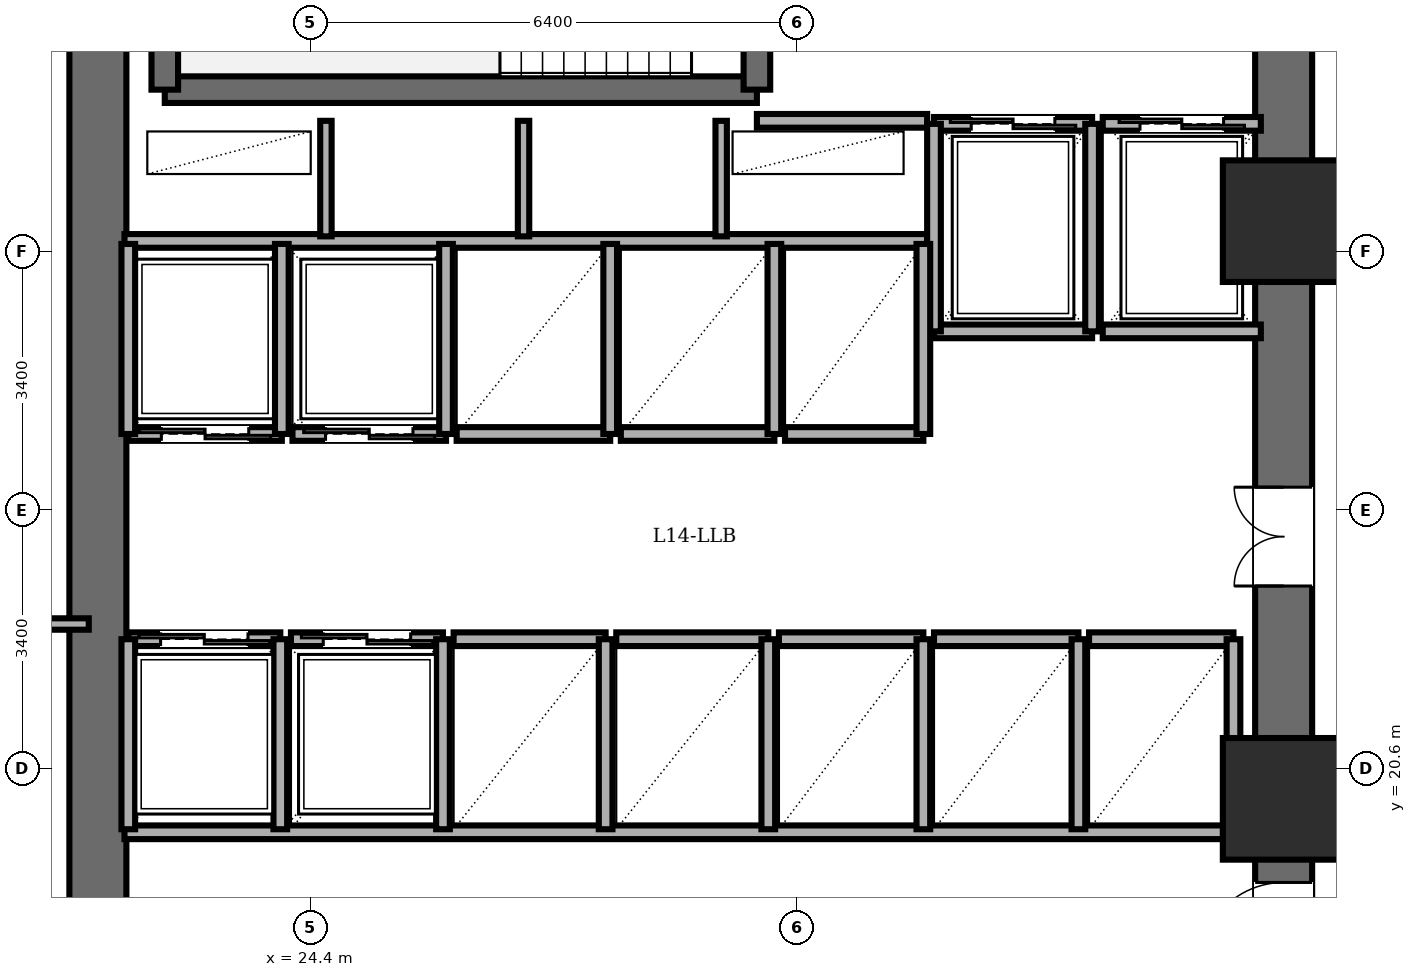
"""IFC4 building model, lengths in metres.
Left out: names, types, materials, properties, quantities, classifications, styles, units other than length and angle.
Written with IfcOpenShell. Run it as: python <this file> out.ifc"""

import sys

from ifc_helpers import new_model, si_unit, direction, frame, frame_2d, origin, origin_2d, place, context, subcontext, project, spatial, rectangle, extrude, element, fill, save


model = new_model("IFC4")
c1 = context("Model", 3, precision=1e-05, world=origin(), true_north=direction((0.0, 1.0)))
c2 = subcontext(c1, "Body", "Model", "MODEL_VIEW")
j1 = project(units=[si_unit("LENGTHUNIT", "METRE"), si_unit("PLANEANGLEUNIT", "RADIAN")], contexts=[c1])
p1 = place(None, origin())
s1 = spatial("IfcSite", under=j1, at=p1, CompositionType="ELEMENT")
p2 = place(p1, origin())
s2 = spatial("IfcBuilding", under=s1, at=p2, CompositionType="ELEMENT")
p3 = place(p2, frame((0.0, 0.0, 54.0)))
s3 = spatial("IfcBuildingStorey", under=s2, at=p3, CompositionType="ELEMENT", Elevation=54.0)
for number, where, z_axis, x_axis in (
    (1, (37.2, 20.2, 0.0), (0.0, 0.0, 1.0), (1.0, 0.0, 0.0)),
    (2, (37.2, 27.8, 0.0), (0.0, 0.0, 1.0), (1.0, 0.0, 0.0)),
):
    element("IfcColumn", number, at=place(p3, frame(where, z_axis=z_axis, x_axis=x_axis)), inside=s3, PredefinedType="COLUMN", context=c2, shape_type="SweptSolid", body=[
        extrude(rectangle(XDim=1.6, YDim=1.6, at=origin_2d()), origin(), (0.0, 0.0, 1.0), 3.6),
    ])
p4 = place(p3, frame((21.6, 14.4, 0.0), z_axis=(0.0, 0.0, 1.0), x_axis=(0.0, 1.0, 0.0)))
e3 = element("IfcWall", 3, at=p4, inside=s3, PredefinedType="SHEAR", context=c2, shape_type="SweptSolid", body=[
    extrude(rectangle(XDim=19.2, YDim=0.75, at=frame_2d((9.6, 0.0))), origin(), (0.0, 0.0, 1.0), 3.4),
])
p5 = place(p3, frame((37.2, 14.4, 0.0), z_axis=(0.0, 0.0, 1.0), x_axis=(0.0, 1.0, 0.0)))
e4 = element("IfcWall", 4, at=p5, inside=s3, PredefinedType="SHEAR", context=c2, shape_type="SweptSolid", body=[
    extrude(rectangle(XDim=19.2, YDim=0.75, at=frame_2d((9.6, 0.0))), origin(), (0.0, 0.0, 1.0), 3.4),
])
p6 = place(p5, frame((15.8, 0.0, 0.0)))
e5 = element("IfcOpeningElement", 5, at=p6, cuts=e4, PredefinedType="OPENING", context=c2, shape_type="SweptSolid", body=[
    extrude(rectangle(XDim=1.15, YDim=2.15, at=frame_2d((0.575, 1.075))), frame((0.0, 0.385, 0.0), z_axis=(0.0, -1.0, 0.0), x_axis=(1.0, 0.0, 0.0)), (0.0, 0.0, 1.0), 0.77),
])
p7 = place(p5, frame((3.6, 0.0, 0.0)))
e6 = element("IfcOpeningElement", 6, at=p7, cuts=e4, PredefinedType="OPENING", context=c2, shape_type="SweptSolid", body=[
    extrude(rectangle(XDim=1.1, YDim=2.15, at=frame_2d((0.55, 1.075))), frame((0.0, 0.385, 0.0), z_axis=(0.0, -1.0, 0.0), x_axis=(1.0, 0.0, 0.0)), (0.0, 0.0, 1.0), 0.77),
])
p8 = place(p5, frame((8.6, 0.0, 0.0)))
e7 = element("IfcOpeningElement", 7, at=p8, cuts=e4, PredefinedType="OPENING", context=c2, shape_type="SweptSolid", body=[
    extrude(rectangle(XDim=1.3, YDim=2.2, at=frame_2d((0.65, 1.1))), frame((0.0, 0.385, 0.0), z_axis=(0.0, -1.0, 0.0), x_axis=(1.0, 0.0, 0.0)), (0.0, 0.0, 1.0), 0.77),
])
p9 = place(p3, frame((22.48, 29.53, 0.0), z_axis=(0.0, 0.0, 1.0), x_axis=(1.0, 0.0, 0.0)))
e8 = element("IfcWall", 8, at=p9, inside=s3, PredefinedType="SOLIDWALL", context=c2, shape_type="SweptSolid", body=[
    extrude(rectangle(XDim=7.79, YDim=0.35, at=frame_2d((3.895, 0.0))), origin(), (0.0, 0.0, 1.0), 3.4),
])
p10 = place(p3, frame((22.48, 29.53, 0.0), z_axis=(0.0, 0.0, 1.0), x_axis=(0.0, 1.0, 0.0)))
e9 = element("IfcWall", 9, at=p10, inside=s3, PredefinedType="SOLIDWALL", context=c2, shape_type="SweptSolid", body=[
    extrude(rectangle(XDim=3.58, YDim=0.35, at=frame_2d((1.79, 0.0))), origin(), (0.0, 0.0, 1.0), 3.4),
])
p11 = place(p3, frame((30.27, 29.53, 0.0), z_axis=(0.0, 0.0, 1.0), x_axis=(0.0, 1.0, 0.0)))
e10 = element("IfcWall", 10, at=p11, inside=s3, PredefinedType="SOLIDWALL", context=c2, shape_type="SweptSolid", body=[
    extrude(rectangle(XDim=3.58, YDim=0.35, at=frame_2d((1.79, 0.0))), origin(), (0.0, 0.0, 1.0), 3.4),
])
p12 = place(p11, frame((1.25, 0.0, 0.0)))
e11 = element("IfcOpeningElement", 11, at=p12, cuts=e10, PredefinedType="OPENING", context=c2, shape_type="SweptSolid", body=[
    extrude(rectangle(XDim=1.1, YDim=2.15, at=frame_2d((0.55, 1.075))), frame((0.0, 0.185, 0.0), z_axis=(0.0, -1.0, 0.0), x_axis=(1.0, 0.0, 0.0)), (0.0, 0.0, 1.0), 0.37),
])
p13 = place(p3, frame((30.27, 29.12, 0.0), z_axis=(0.0, 0.0, 1.0), x_axis=(1.0, 0.0, 0.0)))
e12 = element("IfcWall", 12, at=p13, inside=s3, PredefinedType="PARTITIONING", context=c2, shape_type="SweptSolid", body=[
    extrude(rectangle(XDim=2.24, YDim=0.18, at=frame_2d((1.12, 0.0))), origin(), (0.0, 0.0, 1.0), 3.4),
])
p14 = place(p3, frame((21.95, 27.54, 0.0), z_axis=(0.0, 0.0, 1.0), x_axis=(1.0, 0.0, 0.0)))
e13 = element("IfcWall", 13, at=p14, inside=s3, PredefinedType="PARTITIONING", context=c2, shape_type="SweptSolid", body=[
    extrude(rectangle(XDim=10.56, YDim=0.18, at=frame_2d((5.28, 0.0))), origin(), (0.0, 0.0, 1.0), 3.4),
])
for number, where, z_axis, x_axis in (
    (14, (24.6, 27.6, 0.0), (0.0, 0.0, 1.0), (0.0, 1.0, 0.0)),
    (15, (27.2, 27.6, 0.0), (0.0, 0.0, 1.0), (0.0, 1.0, 0.0)),
    (16, (29.8, 27.6, 0.0), (0.0, 0.0, 1.0), (0.0, 1.0, 0.0)),
):
    element("IfcWall", number, at=place(p3, frame(where, z_axis=z_axis, x_axis=x_axis)), inside=s3, PredefinedType="PARTITIONING", context=c2, shape_type="SweptSolid", body=[
        extrude(rectangle(XDim=1.52, YDim=0.15, at=frame_2d((0.76, 0.0))), origin(), (0.0, 0.0, 1.0), 3.4),
    ])
p15 = place(p3, frame((21.95, 19.76, 0.0), z_axis=(0.0, 0.0, 1.0), x_axis=(1.0, 0.0, 0.0)))
e17 = element("IfcWall", 17, at=p15, inside=s3, PredefinedType="PARTITIONING", context=c2, shape_type="SweptSolid", body=[
    extrude(rectangle(XDim=14.87, YDim=0.18, at=frame_2d((7.435, 0.0))), origin(), (0.0, 0.0, 1.0), 3.4),
])
p16 = place(p3, frame((32.6, 29.08, 0.0), z_axis=(0.0, 0.0, 1.0), x_axis=(1.0, 0.0, 0.0)))
e18 = element("IfcWall", 18, at=p16, inside=s3, PredefinedType="PARTITIONING", context=c2, shape_type="SweptSolid", body=[
    extrude(rectangle(XDim=2.08, YDim=0.18, at=frame_2d((1.04, 0.0))), origin(), (0.0, 0.0, 1.0), 3.4),
])
p17 = place(p16, frame((0.49, 0.0, 0.0)))
e19 = element("IfcOpeningElement", 19, at=p17, cuts=e18, PredefinedType="OPENING", context=c2, shape_type="SweptSolid", body=[
    extrude(rectangle(XDim=1.1, YDim=2.2, at=frame_2d((0.55, 1.1))), frame((0.0, 0.1, 0.0), z_axis=(0.0, -1.0, 0.0), x_axis=(1.0, 0.0, 0.0)), (0.0, 0.0, 1.0), 0.2),
])
p18 = place(p3, frame((34.68, 26.35, 0.0), z_axis=(0.0, 0.0, 1.0), x_axis=(-1.0, 0.0, 0.0)))
e20 = element("IfcWall", 20, at=p18, inside=s3, PredefinedType="PARTITIONING", context=c2, shape_type="SweptSolid", body=[
    extrude(rectangle(XDim=2.08, YDim=0.18, at=frame_2d((1.04, 0.0))), origin(), (0.0, 0.0, 1.0), 3.4),
])
for number, where, z_axis, x_axis in (
    (21, (34.68, 26.35, 0.0), (0.0, 0.0, 1.0), (0.0, 1.0, 0.0)),
    (22, (32.6, 29.08, 0.0), (0.0, 0.0, 1.0), (0.0, -1.0, 0.0)),
):
    element("IfcWall", number, at=place(p3, frame(where, z_axis=z_axis, x_axis=x_axis)), inside=s3, PredefinedType="PARTITIONING", context=c2, shape_type="SweptSolid", body=[
        extrude(rectangle(XDim=2.73, YDim=0.18, at=frame_2d((1.365, 0.0))), origin(), (0.0, 0.0, 1.0), 3.4),
    ])
p19 = place(p3, frame((34.82, 29.08, 0.0), z_axis=(0.0, 0.0, 1.0), x_axis=(1.0, 0.0, 0.0)))
e23 = element("IfcWall", 23, at=p19, inside=s3, PredefinedType="PARTITIONING", context=c2, shape_type="SweptSolid", body=[
    extrude(rectangle(XDim=2.08, YDim=0.18, at=frame_2d((1.04, 0.0))), origin(), (0.0, 0.0, 1.0), 3.4),
])
p20 = place(p19, frame((0.49, 0.0, 0.0)))
e24 = element("IfcOpeningElement", 24, at=p20, cuts=e23, PredefinedType="OPENING", context=c2, shape_type="SweptSolid", body=[
    extrude(rectangle(XDim=1.1, YDim=2.2, at=frame_2d((0.55, 1.1))), frame((0.0, 0.1, 0.0), z_axis=(0.0, -1.0, 0.0), x_axis=(1.0, 0.0, 0.0)), (0.0, 0.0, 1.0), 0.2),
])
p21 = place(p3, frame((36.9, 26.35, 0.0), z_axis=(0.0, 0.0, 1.0), x_axis=(-1.0, 0.0, 0.0)))
e25 = element("IfcWall", 25, at=p21, inside=s3, PredefinedType="PARTITIONING", context=c2, shape_type="SweptSolid", body=[
    extrude(rectangle(XDim=2.08, YDim=0.18, at=frame_2d((1.04, 0.0))), origin(), (0.0, 0.0, 1.0), 3.4),
])
p22 = place(p3, frame((24.02, 25.0, 0.0), z_axis=(0.0, 0.0, 1.0), x_axis=(-1.0, 0.0, 0.0)))
e26 = element("IfcWall", 26, at=p22, inside=s3, PredefinedType="PARTITIONING", context=c2, shape_type="SweptSolid", body=[
    extrude(rectangle(XDim=2.02, YDim=0.18, at=frame_2d((1.01, 0.0))), origin(), (0.0, 0.0, 1.0), 3.4),
])
p23 = place(p22, frame((0.435, 0.0, 0.0)))
e27 = element("IfcOpeningElement", 27, at=p23, cuts=e26, PredefinedType="OPENING", context=c2, shape_type="SweptSolid", body=[
    extrude(rectangle(XDim=1.15, YDim=2.2, at=frame_2d((0.575, 1.1))), frame((0.0, 0.1, 0.0), z_axis=(0.0, -1.0, 0.0), x_axis=(1.0, 0.0, 0.0)), (0.0, 0.0, 1.0), 0.2),
])
for number, where, z_axis, x_axis in (
    (28, (24.02, 25.0, 0.0), (0.0, 0.0, 1.0), (0.0, 1.0, 0.0)),
    (29, (22.0, 27.5, 0.0), (0.0, 0.0, 1.0), (0.0, -1.0, 0.0)),
):
    element("IfcWall", number, at=place(p3, frame(where, z_axis=z_axis, x_axis=x_axis)), inside=s3, PredefinedType="PARTITIONING", context=c2, shape_type="SweptSolid", body=[
        extrude(rectangle(XDim=2.5, YDim=0.18, at=frame_2d((1.25, 0.0))), origin(), (0.0, 0.0, 1.0), 3.4),
    ])
p24 = place(p3, frame((26.18, 25.0, 0.0), z_axis=(0.0, 0.0, 1.0), x_axis=(-1.0, 0.0, 0.0)))
e30 = element("IfcWall", 30, at=p24, inside=s3, PredefinedType="PARTITIONING", context=c2, shape_type="SweptSolid", body=[
    extrude(rectangle(XDim=2.02, YDim=0.18, at=frame_2d((1.01, 0.0))), origin(), (0.0, 0.0, 1.0), 3.4),
])
p25 = place(p24, frame((0.435, 0.0, 0.0)))
e31 = element("IfcOpeningElement", 31, at=p25, cuts=e30, PredefinedType="OPENING", context=c2, shape_type="SweptSolid", body=[
    extrude(rectangle(XDim=1.15, YDim=2.2, at=frame_2d((0.575, 1.1))), frame((0.0, 0.1, 0.0), z_axis=(0.0, -1.0, 0.0), x_axis=(1.0, 0.0, 0.0)), (0.0, 0.0, 1.0), 0.2),
])
p26 = place(p3, frame((26.18, 25.0, 0.0), z_axis=(0.0, 0.0, 1.0), x_axis=(0.0, 1.0, 0.0)))
e32 = element("IfcWall", 32, at=p26, inside=s3, PredefinedType="PARTITIONING", context=c2, shape_type="SweptSolid", body=[
    extrude(rectangle(XDim=2.5, YDim=0.18, at=frame_2d((1.25, 0.0))), origin(), (0.0, 0.0, 1.0), 3.4),
])
p27 = place(p3, frame((22.0, 22.3, 0.0), z_axis=(0.0, 0.0, 1.0), x_axis=(1.0, 0.0, 0.0)))
e33 = element("IfcWall", 33, at=p27, inside=s3, PredefinedType="PARTITIONING", context=c2, shape_type="SweptSolid", body=[
    extrude(rectangle(XDim=2.0, YDim=0.18, at=frame_2d((1.0, 0.0))), origin(), (0.0, 0.0, 1.0), 3.4),
])
p28 = place(p27, frame((0.425, 0.0, 0.0)))
e34 = element("IfcOpeningElement", 34, at=p28, cuts=e33, PredefinedType="OPENING", context=c2, shape_type="SweptSolid", body=[
    extrude(rectangle(XDim=1.15, YDim=2.2, at=frame_2d((0.575, 1.1))), frame((0.0, 0.1, 0.0), z_axis=(0.0, -1.0, 0.0), x_axis=(1.0, 0.0, 0.0)), (0.0, 0.0, 1.0), 0.2),
])
for number, where, z_axis, x_axis in (
    (35, (24.0, 19.8, 0.0), (0.0, 0.0, 1.0), (0.0, 1.0, 0.0)),
    (36, (22.0, 22.3, 0.0), (0.0, 0.0, 1.0), (0.0, -1.0, 0.0)),
):
    element("IfcWall", number, at=place(p3, frame(where, z_axis=z_axis, x_axis=x_axis)), inside=s3, PredefinedType="PARTITIONING", context=c2, shape_type="SweptSolid", body=[
        extrude(rectangle(XDim=2.5, YDim=0.18, at=frame_2d((1.25, 0.0))), origin(), (0.0, 0.0, 1.0), 3.4),
    ])
p29 = place(p3, frame((24.14, 22.3, 0.0), z_axis=(0.0, 0.0, 1.0), x_axis=(1.0, 0.0, 0.0)))
e37 = element("IfcWall", 37, at=p29, inside=s3, PredefinedType="PARTITIONING", context=c2, shape_type="SweptSolid", body=[
    extrude(rectangle(XDim=2.0, YDim=0.18, at=frame_2d((1.0, 0.0))), origin(), (0.0, 0.0, 1.0), 3.4),
])
p30 = place(p29, frame((0.425, 0.0, 0.0)))
e38 = element("IfcOpeningElement", 38, at=p30, cuts=e37, PredefinedType="OPENING", context=c2, shape_type="SweptSolid", body=[
    extrude(rectangle(XDim=1.15, YDim=2.2, at=frame_2d((0.575, 1.1))), frame((0.0, 0.1, 0.0), z_axis=(0.0, -1.0, 0.0), x_axis=(1.0, 0.0, 0.0)), (0.0, 0.0, 1.0), 0.2),
])
p31 = place(p3, frame((26.14, 19.8, 0.0), z_axis=(0.0, 0.0, 1.0), x_axis=(0.0, 1.0, 0.0)))
e39 = element("IfcWall", 39, at=p31, inside=s3, PredefinedType="PARTITIONING", context=c2, shape_type="SweptSolid", body=[
    extrude(rectangle(XDim=2.5, YDim=0.18, at=frame_2d((1.25, 0.0))), origin(), (0.0, 0.0, 1.0), 3.4),
])
p32 = place(p3, frame((28.34, 25.0, 0.0), z_axis=(0.0, 0.0, 1.0), x_axis=(-1.0, 0.0, 0.0)))
e40 = element("IfcWall", 40, at=p32, inside=s3, PredefinedType="PARTITIONING", context=c2, shape_type="SweptSolid", body=[
    extrude(rectangle(XDim=2.02, YDim=0.18, at=frame_2d((1.01, 0.0))), origin(), (0.0, 0.0, 1.0), 3.4),
])
p33 = place(p3, frame((28.34, 25.0, 0.0), z_axis=(0.0, 0.0, 1.0), x_axis=(0.0, 1.0, 0.0)))
e41 = element("IfcWall", 41, at=p33, inside=s3, PredefinedType="PARTITIONING", context=c2, shape_type="SweptSolid", body=[
    extrude(rectangle(XDim=2.5, YDim=0.18, at=frame_2d((1.25, 0.0))), origin(), (0.0, 0.0, 1.0), 3.4),
])
p34 = place(p3, frame((30.5, 25.0, 0.0), z_axis=(0.0, 0.0, 1.0), x_axis=(-1.0, 0.0, 0.0)))
e42 = element("IfcWall", 42, at=p34, inside=s3, PredefinedType="PARTITIONING", context=c2, shape_type="SweptSolid", body=[
    extrude(rectangle(XDim=2.02, YDim=0.18, at=frame_2d((1.01, 0.0))), origin(), (0.0, 0.0, 1.0), 3.4),
])
p35 = place(p3, frame((30.5, 25.0, 0.0), z_axis=(0.0, 0.0, 1.0), x_axis=(0.0, 1.0, 0.0)))
e43 = element("IfcWall", 43, at=p35, inside=s3, PredefinedType="PARTITIONING", context=c2, shape_type="SweptSolid", body=[
    extrude(rectangle(XDim=2.5, YDim=0.18, at=frame_2d((1.25, 0.0))), origin(), (0.0, 0.0, 1.0), 3.4),
])
p36 = place(p3, frame((26.28, 22.3, 0.0), z_axis=(0.0, 0.0, 1.0), x_axis=(1.0, 0.0, 0.0)))
e44 = element("IfcWall", 44, at=p36, inside=s3, PredefinedType="PARTITIONING", context=c2, shape_type="SweptSolid", body=[
    extrude(rectangle(XDim=2.0, YDim=0.18, at=frame_2d((1.0, 0.0))), origin(), (0.0, 0.0, 1.0), 3.4),
])
p37 = place(p3, frame((28.28, 19.8, 0.0), z_axis=(0.0, 0.0, 1.0), x_axis=(0.0, 1.0, 0.0)))
e45 = element("IfcWall", 45, at=p37, inside=s3, PredefinedType="PARTITIONING", context=c2, shape_type="SweptSolid", body=[
    extrude(rectangle(XDim=2.5, YDim=0.18, at=frame_2d((1.25, 0.0))), origin(), (0.0, 0.0, 1.0), 3.4),
])
p38 = place(p3, frame((28.42, 22.3, 0.0), z_axis=(0.0, 0.0, 1.0), x_axis=(1.0, 0.0, 0.0)))
e46 = element("IfcWall", 46, at=p38, inside=s3, PredefinedType="PARTITIONING", context=c2, shape_type="SweptSolid", body=[
    extrude(rectangle(XDim=2.0, YDim=0.18, at=frame_2d((1.0, 0.0))), origin(), (0.0, 0.0, 1.0), 3.4),
])
p39 = place(p3, frame((30.42, 19.8, 0.0), z_axis=(0.0, 0.0, 1.0), x_axis=(0.0, 1.0, 0.0)))
e47 = element("IfcWall", 47, at=p39, inside=s3, PredefinedType="PARTITIONING", context=c2, shape_type="SweptSolid", body=[
    extrude(rectangle(XDim=2.5, YDim=0.18, at=frame_2d((1.25, 0.0))), origin(), (0.0, 0.0, 1.0), 3.4),
])
p40 = place(p3, frame((32.46, 25.0, 0.0), z_axis=(0.0, 0.0, 1.0), x_axis=(-1.0, 0.0, 0.0)))
e48 = element("IfcWall", 48, at=p40, inside=s3, PredefinedType="PARTITIONING", context=c2, shape_type="SweptSolid", body=[
    extrude(rectangle(XDim=1.82, YDim=0.18, at=frame_2d((0.91, 0.0))), origin(), (0.0, 0.0, 1.0), 3.4),
])
p41 = place(p3, frame((32.46, 25.0, 0.0), z_axis=(0.0, 0.0, 1.0), x_axis=(0.0, 1.0, 0.0)))
e49 = element("IfcWall", 49, at=p41, inside=s3, PredefinedType="PARTITIONING", context=c2, shape_type="SweptSolid", body=[
    extrude(rectangle(XDim=2.5, YDim=0.18, at=frame_2d((1.25, 0.0))), origin(), (0.0, 0.0, 1.0), 3.4),
])
p42 = place(p3, frame((30.56, 22.3, 0.0), z_axis=(0.0, 0.0, 1.0), x_axis=(1.0, 0.0, 0.0)))
e50 = element("IfcWall", 50, at=p42, inside=s3, PredefinedType="PARTITIONING", context=c2, shape_type="SweptSolid", body=[
    extrude(rectangle(XDim=1.9, YDim=0.18, at=frame_2d((0.95, 0.0))), origin(), (0.0, 0.0, 1.0), 3.4),
])
p43 = place(p3, frame((32.46, 19.8, 0.0), z_axis=(0.0, 0.0, 1.0), x_axis=(0.0, 1.0, 0.0)))
e51 = element("IfcWall", 51, at=p43, inside=s3, PredefinedType="PARTITIONING", context=c2, shape_type="SweptSolid", body=[
    extrude(rectangle(XDim=2.5, YDim=0.18, at=frame_2d((1.25, 0.0))), origin(), (0.0, 0.0, 1.0), 3.4),
])
p44 = place(p3, frame((32.6, 22.3, 0.0), z_axis=(0.0, 0.0, 1.0), x_axis=(1.0, 0.0, 0.0)))
e52 = element("IfcWall", 52, at=p44, inside=s3, PredefinedType="PARTITIONING", context=c2, shape_type="SweptSolid", body=[
    extrude(rectangle(XDim=1.9, YDim=0.18, at=frame_2d((0.95, 0.0))), origin(), (0.0, 0.0, 1.0), 3.4),
])
p45 = place(p3, frame((34.5, 19.8, 0.0), z_axis=(0.0, 0.0, 1.0), x_axis=(0.0, 1.0, 0.0)))
e53 = element("IfcWall", 53, at=p45, inside=s3, PredefinedType="PARTITIONING", context=c2, shape_type="SweptSolid", body=[
    extrude(rectangle(XDim=2.5, YDim=0.18, at=frame_2d((1.25, 0.0))), origin(), (0.0, 0.0, 1.0), 3.4),
])
p46 = place(p3, frame((34.64, 22.3, 0.0), z_axis=(0.0, 0.0, 1.0), x_axis=(1.0, 0.0, 0.0)))
e54 = element("IfcWall", 54, at=p46, inside=s3, PredefinedType="PARTITIONING", context=c2, shape_type="SweptSolid", body=[
    extrude(rectangle(XDim=1.9, YDim=0.18, at=frame_2d((0.95, 0.0))), origin(), (0.0, 0.0, 1.0), 3.4),
])
p47 = place(p3, frame((36.54, 19.8, 0.0), z_axis=(0.0, 0.0, 1.0), x_axis=(0.0, 1.0, 0.0)))
e55 = element("IfcWall", 55, at=p47, inside=s3, PredefinedType="PARTITIONING", context=c2, shape_type="SweptSolid", body=[
    extrude(rectangle(XDim=2.5, YDim=0.18, at=frame_2d((1.25, 0.0))), origin(), (0.0, 0.0, 1.0), 3.4),
])
p48 = place(p3, frame((3.4, 22.5, 0.0), z_axis=(0.0, 0.0, 1.0), x_axis=(1.0, 0.0, 0.0)))
e56 = element("IfcWall", 56, at=p48, inside=s3, PredefinedType="PARTITIONING", context=c2, shape_type="SweptSolid", body=[
    extrude(rectangle(XDim=18.08, YDim=0.15, at=frame_2d((9.04, 0.0))), origin(), (0.0, 0.0, 1.0), 3.4),
])
p49 = place(p7, origin())
e57 = element("IfcDoor", 57, at=p49, inside=s3, OperationType="SINGLE_SWING_LEFT", PredefinedType="DOOR", context=c2, shape_type="SweptSolid", body=[
    extrude(rectangle(XDim=1.1, YDim=2.15, at=frame_2d((0.55, 1.075))), frame((0.0, 0.025, 0.0), z_axis=(0.0, -1.0, 0.0), x_axis=(1.0, 0.0, 0.0)), (0.0, 0.0, 1.0), 0.05),
])
fill(e6, e57)
p50 = place(p17, origin())
e58 = element("IfcDoor", 58, at=p50, inside=s3, OperationType="DOUBLE_DOOR_SLIDING", PredefinedType="DOOR", context=c2, shape_type="SweptSolid", body=[
    extrude(rectangle(XDim=1.1, YDim=2.2, at=frame_2d((0.55, 1.1))), frame((0.0, 0.025, 0.0), z_axis=(0.0, -1.0, 0.0), x_axis=(1.0, 0.0, 0.0)), (0.0, 0.0, 1.0), 0.05),
])
fill(e19, e58)
p51 = place(p20, origin())
e59 = element("IfcDoor", 59, at=p51, inside=s3, OperationType="DOUBLE_DOOR_SLIDING", PredefinedType="DOOR", context=c2, shape_type="SweptSolid", body=[
    extrude(rectangle(XDim=1.1, YDim=2.2, at=frame_2d((0.55, 1.1))), frame((0.0, 0.025, 0.0), z_axis=(0.0, -1.0, 0.0), x_axis=(1.0, 0.0, 0.0)), (0.0, 0.0, 1.0), 0.05),
])
fill(e24, e59)
p52 = place(p23, origin())
e60 = element("IfcDoor", 60, at=p52, inside=s3, OperationType="DOUBLE_DOOR_SLIDING", PredefinedType="DOOR", context=c2, shape_type="SweptSolid", body=[
    extrude(rectangle(XDim=1.15, YDim=2.2, at=frame_2d((0.575, 1.1))), frame((0.0, 0.025, 0.0), z_axis=(0.0, -1.0, 0.0), x_axis=(1.0, 0.0, 0.0)), (0.0, 0.0, 1.0), 0.05),
])
fill(e27, e60)
p53 = place(p25, origin())
e61 = element("IfcDoor", 61, at=p53, inside=s3, OperationType="DOUBLE_DOOR_SLIDING", PredefinedType="DOOR", context=c2, shape_type="SweptSolid", body=[
    extrude(rectangle(XDim=1.15, YDim=2.2, at=frame_2d((0.575, 1.1))), frame((0.0, 0.025, 0.0), z_axis=(0.0, -1.0, 0.0), x_axis=(1.0, 0.0, 0.0)), (0.0, 0.0, 1.0), 0.05),
])
fill(e31, e61)
p54 = place(p28, origin())
e62 = element("IfcDoor", 62, at=p54, inside=s3, OperationType="DOUBLE_DOOR_SLIDING", PredefinedType="DOOR", context=c2, shape_type="SweptSolid", body=[
    extrude(rectangle(XDim=1.15, YDim=2.2, at=frame_2d((0.575, 1.1))), frame((0.0, 0.025, 0.0), z_axis=(0.0, -1.0, 0.0), x_axis=(1.0, 0.0, 0.0)), (0.0, 0.0, 1.0), 0.05),
])
fill(e34, e62)
p55 = place(p30, origin())
e63 = element("IfcDoor", 63, at=p55, inside=s3, OperationType="DOUBLE_DOOR_SLIDING", PredefinedType="DOOR", context=c2, shape_type="SweptSolid", body=[
    extrude(rectangle(XDim=1.15, YDim=2.2, at=frame_2d((0.575, 1.1))), frame((0.0, 0.025, 0.0), z_axis=(0.0, -1.0, 0.0), x_axis=(1.0, 0.0, 0.0)), (0.0, 0.0, 1.0), 0.05),
])
fill(e38, e63)
p56 = place(p8, origin())
e64 = element("IfcDoor", 64, at=p56, inside=s3, OperationType="DOUBLE_DOOR_SINGLE_SWING", PredefinedType="DOOR", context=c2, shape_type="SweptSolid", body=[
    extrude(rectangle(XDim=1.3, YDim=2.2, at=frame_2d((0.65, 1.1))), frame((0.0, 0.025, 0.0), z_axis=(0.0, -1.0, 0.0), x_axis=(1.0, 0.0, 0.0)), (0.0, 0.0, 1.0), 0.05),
])
fill(e7, e64)
save(model, sys.argv[1])
